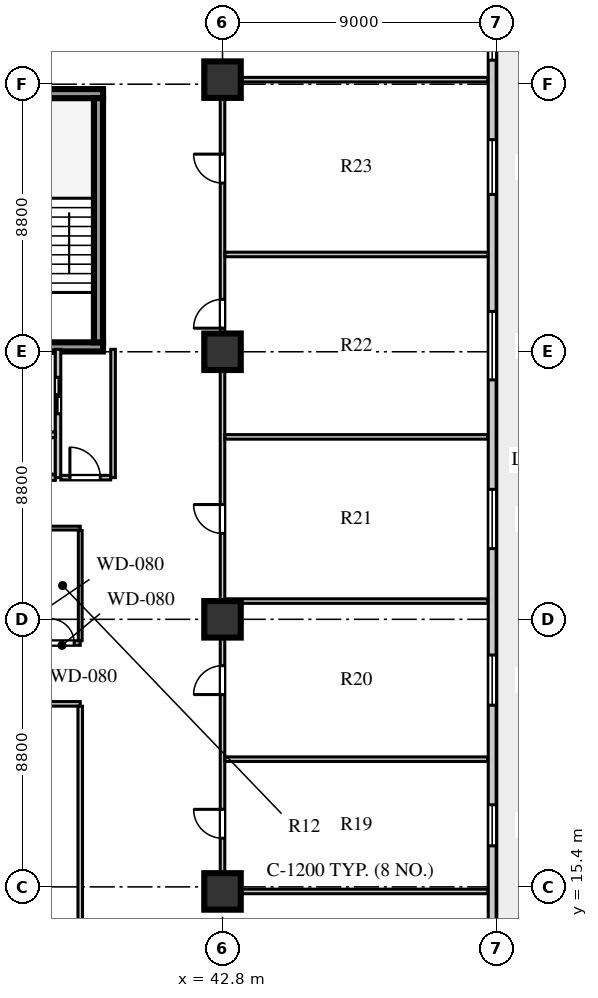
"""IFC4 building model, lengths in metres.
Left out: names, types, materials, properties, quantities, classifications, styles, units other than length and angle.
Written with IfcOpenShell. Run it as: python <this file> out.ifc"""

import sys

from ifc_helpers import new_model, si_unit, direction, frame, frame_2d, origin, origin_2d, place, context, subcontext, project, spatial, rectangle, extrude, element, fill, save


model = new_model("IFC4")
c1 = context("Model", 3, precision=1e-05, world=origin(), true_north=direction((0.0, 1.0)))
c2 = subcontext(c1, "Body", "Model", "MODEL_VIEW")
j1 = project(units=[si_unit("LENGTHUNIT", "METRE"), si_unit("PLANEANGLEUNIT", "RADIAN")], contexts=[c1])
p1 = place(None, origin())
s1 = spatial("IfcSite", under=j1, at=p1, CompositionType="ELEMENT")
p2 = place(p1, origin())
s2 = spatial("IfcBuilding", under=s1, at=p2, CompositionType="ELEMENT")
p3 = place(p2, frame((0.0, 0.0, 50.0)))
s3 = spatial("IfcBuildingStorey", under=s2, at=p3, CompositionType="ELEMENT", Elevation=50.0)
for number, where, z_axis, x_axis in (
    (1, (34.4, 33.16, 0.0), (0.0, 0.0, 1.0), (1.0, 0.0, 0.0)),
    (2, (34.4, 41.49, 0.0), (0.0, 0.0, 1.0), (1.0, 0.0, 0.0)),
):
    element("IfcWall", number, at=place(p3, frame(where, z_axis=z_axis, x_axis=x_axis)), inside=s3, PredefinedType="SHEAR", context=c2, shape_type="SweptSolid", body=[
        extrude(rectangle(XDim=4.47, YDim=0.3, at=frame_2d((2.235, 0.0))), origin(), (0.0, 0.0, 1.0), 3.72),
    ])
p4 = place(p3, frame((38.72, 33.31, 0.0), z_axis=(0.0, 0.0, 1.0), x_axis=(0.0, 1.0, 0.0)))
e3 = element("IfcWall", 3, at=p4, inside=s3, PredefinedType="SHEAR", context=c2, shape_type="SweptSolid", body=[
    extrude(rectangle(XDim=8.03, YDim=0.3, at=frame_2d((4.015, 0.0))), origin(), (0.0, 0.0, 1.0), 3.72),
])
for number, where, z_axis, x_axis in (
    (4, (42.8, 15.25, 0.0), (0.0, 0.0, 1.0), (1.0, 0.0, 0.0)),
    (5, (42.8, 24.2, 0.0), (0.0, 0.0, 1.0), (1.0, 0.0, 0.0)),
    (6, (42.8, 33.0, 0.0), (0.0, 0.0, 1.0), (1.0, 0.0, 0.0)),
    (7, (42.8, 41.95, 0.0), (0.0, 0.0, 1.0), (1.0, 0.0, 0.0)),
):
    element("IfcColumn", number, at=place(p3, frame(where, z_axis=z_axis, x_axis=x_axis)), inside=s3, PredefinedType="COLUMN", context=c2, shape_type="SweptSolid", body=[
        extrude(rectangle(XDim=1.2, YDim=1.2, at=origin_2d()), origin(), (0.0, 0.0, 1.0), 3.72),
    ])
p5 = place(p3, frame((51.67, 12.36, 0.0), z_axis=(0.0, 0.0, 1.0), x_axis=(0.0, 1.0, 0.0)))
e8 = element("IfcWall", 8, at=p5, inside=s3, PredefinedType="SOLIDWALL", context=c2, shape_type="SweptSolid", body=[
    extrude(rectangle(XDim=32.48, YDim=0.26, at=frame_2d((16.24, 0.0))), origin(), (0.0, 0.0, 1.0), 3.72),
])
p6 = place(p5, frame((0.69, 0.0, 0.0)))
e9 = element("IfcOpeningElement", 9, at=p6, cuts=e8, PredefinedType="OPENING", context=c2, shape_type="SweptSolid", body=[
    extrude(rectangle(XDim=1.0, YDim=2.05, at=frame_2d((0.5, 1.025))), frame((0.0, 0.14, 0.0), z_axis=(0.0, -1.0, 0.0), x_axis=(1.0, 0.0, 0.0)), (0.0, 0.0, 1.0), 0.28),
])
p7 = place(p5, frame((4.39, 0.0, 0.8)))
e10 = element("IfcOpeningElement", 10, at=p7, cuts=e8, PredefinedType="OPENING", context=c2, shape_type="SweptSolid", body=[
    extrude(rectangle(XDim=1.35, YDim=1.9, at=frame_2d((0.675, 0.95))), frame((0.0, 0.14, 0.0), z_axis=(0.0, -1.0, 0.0), x_axis=(1.0, 0.0, 0.0)), (0.0, 0.0, 1.0), 0.28),
])
p8 = place(p5, frame((9.015, 0.0, 0.8)))
e11 = element("IfcOpeningElement", 11, at=p8, cuts=e8, PredefinedType="OPENING", context=c2, shape_type="SweptSolid", body=[
    extrude(rectangle(XDim=1.65, YDim=1.95, at=frame_2d((0.825, 0.975))), frame((0.0, 0.14, 0.0), z_axis=(0.0, -1.0, 0.0), x_axis=(1.0, 0.0, 0.0)), (0.0, 0.0, 1.0), 0.28),
])
p9 = place(p5, frame((14.165, 0.0, 0.8)))
e12 = element("IfcOpeningElement", 12, at=p9, cuts=e8, PredefinedType="OPENING", context=c2, shape_type="SweptSolid", body=[
    extrude(rectangle(XDim=1.95, YDim=2.0, at=frame_2d((0.975, 1.0))), frame((0.0, 0.14, 0.0), z_axis=(0.0, -1.0, 0.0), x_axis=(1.0, 0.0, 0.0)), (0.0, 0.0, 1.0), 0.28),
])
p10 = place(p5, frame((19.715, 0.0, 0.8)))
e13 = element("IfcOpeningElement", 13, at=p10, cuts=e8, PredefinedType="OPENING", context=c2, shape_type="SweptSolid", body=[
    extrude(rectangle(XDim=2.25, YDim=2.0, at=frame_2d((1.125, 1.0))), frame((0.0, 0.14, 0.0), z_axis=(0.0, -1.0, 0.0), x_axis=(1.0, 0.0, 0.0)), (0.0, 0.0, 1.0), 0.28),
])
p11 = place(p5, frame((25.815, 0.0, 0.8)))
e14 = element("IfcOpeningElement", 14, at=p11, cuts=e8, PredefinedType="OPENING", context=c2, shape_type="SweptSolid", body=[
    extrude(rectangle(XDim=1.8, YDim=2.0, at=frame_2d((0.9, 1.0))), frame((0.0, 0.14, 0.0), z_axis=(0.0, -1.0, 0.0), x_axis=(1.0, 0.0, 0.0)), (0.0, 0.0, 1.0), 0.28),
])
p12 = place(p5, frame((30.23, 0.0, 0.8)))
e15 = element("IfcOpeningElement", 15, at=p12, cuts=e8, PredefinedType="OPENING", context=c2, shape_type="SweptSolid", body=[
    extrude(rectangle(XDim=1.5, YDim=2.0, at=frame_2d((0.75, 1.0))), frame((0.0, 0.14, 0.0), z_axis=(0.0, -1.0, 0.0), x_axis=(1.0, 0.0, 0.0)), (0.0, 0.0, 1.0), 0.28),
])
p13 = place(p3, frame((37.39, 28.86, 0.0), z_axis=(0.0, 0.0, 1.0), x_axis=(0.0, 1.0, 0.0)))
e16 = element("IfcWall", 16, at=p13, inside=s3, PredefinedType="SOLIDWALL", context=c2, shape_type="SweptSolid", body=[
    extrude(rectangle(XDim=4.22, YDim=0.18, at=frame_2d((2.11, 0.0))), origin(), (0.0, 0.0, 1.0), 3.72),
])
p14 = place(p13, frame((2.1, 0.0, 0.0)))
e17 = element("IfcOpeningElement", 17, at=p14, cuts=e16, PredefinedType="OPENING", context=c2, shape_type="SweptSolid", body=[
    extrude(rectangle(XDim=1.2, YDim=2.12, at=frame_2d((0.6, 1.06))), frame((0.0, 0.1, 0.0), z_axis=(0.0, -1.0, 0.0), x_axis=(1.0, 0.0, 0.0)), (0.0, 0.0, 1.0), 0.2),
])
for number, where, z_axis, x_axis in (
    (18, (35.05, 28.86, 0.0), (0.0, 0.0, 1.0), (1.0, 0.0, 0.0)),
    (19, (35.05, 30.27, 0.0), (0.0, 0.0, 1.0), (1.0, 0.0, 0.0)),
):
    element("IfcWall", number, at=place(p3, frame(where, z_axis=z_axis, x_axis=x_axis)), inside=s3, PredefinedType="SOLIDWALL", context=c2, shape_type="SweptSolid", body=[
        extrude(rectangle(XDim=2.25, YDim=0.18, at=frame_2d((1.125, 0.0))), origin(), (0.0, 0.0, 1.0), 3.72),
    ])
p15 = place(p3, frame((39.2, 28.86, 0.0), z_axis=(0.0, 0.0, 1.0), x_axis=(0.0, 1.0, 0.0)))
e20 = element("IfcWall", 20, at=p15, inside=s3, PredefinedType="PARTITIONING", context=c2, shape_type="SweptSolid", body=[
    extrude(rectangle(XDim=4.22, YDim=0.15, at=frame_2d((2.11, 0.0))), origin(), (0.0, 0.0, 1.0), 3.72),
])
p16 = place(p3, frame((37.48, 28.86, 0.0), z_axis=(0.0, 0.0, 1.0), x_axis=(1.0, 0.0, 0.0)))
e21 = element("IfcWall", 21, at=p16, inside=s3, PredefinedType="PARTITIONING", context=c2, shape_type="SweptSolid", body=[
    extrude(rectangle(XDim=1.64, YDim=0.15, at=frame_2d((0.82, 0.0))), origin(), (0.0, 0.0, 1.0), 3.72),
])
p17 = place(p16, frame((0.3, 0.0, 0.0)))
e22 = element("IfcOpeningElement", 22, at=p17, cuts=e21, PredefinedType="OPENING", context=c2, shape_type="SweptSolid", body=[
    extrude(rectangle(XDim=1.0, YDim=2.1, at=frame_2d((0.5, 1.05))), frame((0.0, 0.085, 0.0), z_axis=(0.0, -1.0, 0.0), x_axis=(1.0, 0.0, 0.0)), (0.0, 0.0, 1.0), 0.17),
])
p18 = place(p3, frame((25.25, 21.42, 0.0), z_axis=(0.0, 0.0, 1.0), x_axis=(1.0, 0.0, 0.0)))
e23 = element("IfcWall", 23, at=p18, inside=s3, PredefinedType="PARTITIONING", context=c2, shape_type="SweptSolid", body=[
    extrude(rectangle(XDim=12.87, YDim=0.15, at=frame_2d((6.435, 0.0))), origin(), (0.0, 0.0, 1.0), 3.32),
])
p19 = place(p18, frame((1.525, 0.0, 0.0)))
e24 = element("IfcOpeningElement", 24, at=p19, cuts=e23, PredefinedType="OPENING", context=c2, shape_type="SweptSolid", body=[
    extrude(rectangle(XDim=0.95, YDim=2.08, at=frame_2d((0.475, 1.04))), frame((0.0, 0.085, 0.0), z_axis=(0.0, -1.0, 0.0), x_axis=(1.0, 0.0, 0.0)), (0.0, 0.0, 1.0), 0.17),
])
p20 = place(p18, frame((5.775, 0.0, 0.0)))
e25 = element("IfcOpeningElement", 25, at=p20, cuts=e23, PredefinedType="OPENING", context=c2, shape_type="SweptSolid", body=[
    extrude(rectangle(XDim=0.95, YDim=2.08, at=frame_2d((0.475, 1.04))), frame((0.0, 0.085, 0.0), z_axis=(0.0, -1.0, 0.0), x_axis=(1.0, 0.0, 0.0)), (0.0, 0.0, 1.0), 0.17),
])
p21 = place(p18, frame((10.195, 0.0, 0.0)))
e26 = element("IfcOpeningElement", 26, at=p21, cuts=e23, PredefinedType="OPENING", context=c2, shape_type="SweptSolid", body=[
    extrude(rectangle(XDim=0.95, YDim=2.08, at=frame_2d((0.475, 1.04))), frame((0.0, 0.085, 0.0), z_axis=(0.0, -1.0, 0.0), x_axis=(1.0, 0.0, 0.0)), (0.0, 0.0, 1.0), 0.17),
])
p22 = place(p3, frame((38.12, 6.88, 0.0), z_axis=(0.0, 0.0, 1.0), x_axis=(0.0, 1.0, 0.0)))
e27 = element("IfcWall", 27, at=p22, inside=s3, PredefinedType="PARTITIONING", context=c2, shape_type="SweptSolid", body=[
    extrude(rectangle(XDim=14.46, YDim=0.15, at=frame_2d((7.23, 0.0))), origin(), (0.0, 0.0, 1.0), 3.72),
])
p23 = place(p3, frame((34.6, 23.42, 0.0), z_axis=(0.0, 0.0, 1.0), x_axis=(1.0, 0.0, 0.0)))
e28 = element("IfcWall", 28, at=p23, inside=s3, PredefinedType="PARTITIONING", context=c2, shape_type="SweptSolid", body=[
    extrude(rectangle(XDim=3.52, YDim=0.15, at=frame_2d((1.76, 0.0))), origin(), (0.0, 0.0, 1.0), 3.72),
])
p24 = place(p23, frame((0.22, 0.0, 0.0)))
e29 = element("IfcOpeningElement", 29, at=p24, cuts=e28, PredefinedType="OPENING", context=c2, shape_type="SweptSolid", body=[
    extrude(rectangle(XDim=0.8, YDim=2.05, at=frame_2d((0.4, 1.025))), frame((0.0, 0.085, 0.0), z_axis=(0.0, -1.0, 0.0), x_axis=(1.0, 0.0, 0.0)), (0.0, 0.0, 1.0), 0.17),
])
p25 = place(p23, frame((1.38, 0.0, 0.0)))
e30 = element("IfcOpeningElement", 30, at=p25, cuts=e28, PredefinedType="OPENING", context=c2, shape_type="SweptSolid", body=[
    extrude(rectangle(XDim=0.8, YDim=2.05, at=frame_2d((0.4, 1.025))), frame((0.0, 0.085, 0.0), z_axis=(0.0, -1.0, 0.0), x_axis=(1.0, 0.0, 0.0)), (0.0, 0.0, 1.0), 0.17),
])
p26 = place(p23, frame((2.52, 0.0, 0.0)))
e31 = element("IfcOpeningElement", 31, at=p26, cuts=e28, PredefinedType="OPENING", context=c2, shape_type="SweptSolid", body=[
    extrude(rectangle(XDim=0.8, YDim=2.05, at=frame_2d((0.4, 1.025))), frame((0.0, 0.085, 0.0), z_axis=(0.0, -1.0, 0.0), x_axis=(1.0, 0.0, 0.0)), (0.0, 0.0, 1.0), 0.17),
])
p27 = place(p3, frame((42.8, 15.25, 0.0), z_axis=(0.0, 0.0, 1.0), x_axis=(0.0, 1.0, 0.0)))
e32 = element("IfcWall", 32, at=p27, inside=s3, PredefinedType="PARTITIONING", context=c2, shape_type="SweptSolid", body=[
    extrude(rectangle(XDim=26.7, YDim=0.15, at=frame_2d((13.35, 0.0))), origin(), (0.0, 0.0, 1.0), 3.02),
])
p28 = place(p27, frame((1.75, 0.0, 0.0)))
e33 = element("IfcOpeningElement", 33, at=p28, cuts=e32, PredefinedType="OPENING", context=c2, shape_type="SweptSolid", body=[
    extrude(rectangle(XDim=0.95, YDim=2.08, at=frame_2d((0.475, 1.04))), frame((0.0, 0.085, 0.0), z_axis=(0.0, -1.0, 0.0), x_axis=(1.0, 0.0, 0.0)), (0.0, 0.0, 1.0), 0.17),
])
p29 = place(p27, frame((6.475, 0.0, 0.0)))
e34 = element("IfcOpeningElement", 34, at=p29, cuts=e32, PredefinedType="OPENING", context=c2, shape_type="SweptSolid", body=[
    extrude(rectangle(XDim=0.95, YDim=2.08, at=frame_2d((0.475, 1.04))), frame((0.0, 0.085, 0.0), z_axis=(0.0, -1.0, 0.0), x_axis=(1.0, 0.0, 0.0)), (0.0, 0.0, 1.0), 0.17),
])
p30 = place(p27, frame((11.775, 0.0, 0.0)))
e35 = element("IfcOpeningElement", 35, at=p30, cuts=e32, PredefinedType="OPENING", context=c2, shape_type="SweptSolid", body=[
    extrude(rectangle(XDim=0.95, YDim=2.08, at=frame_2d((0.475, 1.04))), frame((0.0, 0.085, 0.0), z_axis=(0.0, -1.0, 0.0), x_axis=(1.0, 0.0, 0.0)), (0.0, 0.0, 1.0), 0.17),
])
p31 = place(p27, frame((18.525, 0.0, 0.0)))
e36 = element("IfcOpeningElement", 36, at=p31, cuts=e32, PredefinedType="OPENING", context=c2, shape_type="SweptSolid", body=[
    extrude(rectangle(XDim=0.95, YDim=2.08, at=frame_2d((0.475, 1.04))), frame((0.0, 0.085, 0.0), z_axis=(0.0, -1.0, 0.0), x_axis=(1.0, 0.0, 0.0)), (0.0, 0.0, 1.0), 0.17),
])
p32 = place(p27, frame((23.3, 0.0, 0.0)))
e37 = element("IfcOpeningElement", 37, at=p32, cuts=e32, PredefinedType="OPENING", context=c2, shape_type="SweptSolid", body=[
    extrude(rectangle(XDim=0.95, YDim=2.08, at=frame_2d((0.475, 1.04))), frame((0.0, 0.085, 0.0), z_axis=(0.0, -1.0, 0.0), x_axis=(1.0, 0.0, 0.0)), (0.0, 0.0, 1.0), 0.17),
])
for number, where, z_axis, x_axis in (
    (38, (42.88, 15.25, 0.0), (0.0, 0.0, 1.0), (1.0, 0.0, 0.0)),
    (39, (42.88, 41.95, 0.0), (0.0, 0.0, 1.0), (1.0, 0.0, 0.0)),
):
    element("IfcWall", number, at=place(p3, frame(where, z_axis=z_axis, x_axis=x_axis)), inside=s3, PredefinedType="PARTITIONING", context=c2, shape_type="SweptSolid", body=[
        extrude(rectangle(XDim=8.64, YDim=0.15, at=frame_2d((4.32, 0.0))), origin(), (0.0, 0.0, 1.0), 3.22),
    ])
p33 = place(p3, frame((34.6, 27.2, 0.0), z_axis=(0.0, 0.0, 1.0), x_axis=(1.0, 0.0, 0.0)))
e40 = element("IfcWall", 40, at=p33, inside=s3, PredefinedType="PLUMBINGWALL", context=c2, shape_type="SweptSolid", body=[
    extrude(rectangle(XDim=3.52, YDim=0.125, at=frame_2d((1.76, 0.0))), origin(), (0.0, 0.0, 1.0), 3.32),
])
p34 = place(p3, frame((38.12, 23.5, 0.0), z_axis=(0.0, 0.0, 1.0), x_axis=(0.0, 1.0, 0.0)))
e41 = element("IfcWall", 41, at=p34, inside=s3, PredefinedType="PLUMBINGWALL", context=c2, shape_type="SweptSolid", body=[
    extrude(rectangle(XDim=3.62, YDim=0.125, at=frame_2d((1.81, 0.0))), origin(), (0.0, 0.0, 1.0), 3.72),
])
for number, where, z_axis, x_axis in (
    (42, (42.88, 19.6, 0.0), (0.0, 0.0, 1.0), (1.0, 0.0, 0.0)),
    (43, (42.88, 24.8, 0.0), (0.0, 0.0, 1.0), (1.0, 0.0, 0.0)),
    (44, (42.88, 30.2, 0.0), (0.0, 0.0, 1.0), (1.0, 0.0, 0.0)),
    (45, (42.88, 36.2, 0.0), (0.0, 0.0, 1.0), (1.0, 0.0, 0.0)),
):
    element("IfcWall", number, at=place(p3, frame(where, z_axis=z_axis, x_axis=x_axis)), inside=s3, PredefinedType="PARTITIONING", context=c2, shape_type="SweptSolid", body=[
        extrude(rectangle(XDim=8.64, YDim=0.15, at=frame_2d((4.32, 0.0))), origin(), (0.0, 0.0, 1.0), 3.72),
    ])
p35 = place(p7, origin())
e46 = element("IfcWindow", 46, at=p35, inside=s3, PartitioningType="SINGLE_PANEL", PredefinedType="WINDOW", context=c2, shape_type="SweptSolid", body=[
    extrude(rectangle(XDim=1.35, YDim=1.9, at=frame_2d((0.675, 0.95))), frame((0.0, 0.03, 0.0), z_axis=(0.0, -1.0, 0.0), x_axis=(1.0, 0.0, 0.0)), (0.0, 0.0, 1.0), 0.06),
])
fill(e10, e46)
p36 = place(p8, origin())
e47 = element("IfcWindow", 47, at=p36, inside=s3, PartitioningType="SINGLE_PANEL", PredefinedType="WINDOW", context=c2, shape_type="SweptSolid", body=[
    extrude(rectangle(XDim=1.65, YDim=1.95, at=frame_2d((0.825, 0.975))), frame((0.0, 0.03, 0.0), z_axis=(0.0, -1.0, 0.0), x_axis=(1.0, 0.0, 0.0)), (0.0, 0.0, 1.0), 0.06),
])
fill(e11, e47)
p37 = place(p9, origin())
e48 = element("IfcWindow", 48, at=p37, inside=s3, PartitioningType="SINGLE_PANEL", PredefinedType="WINDOW", context=c2, shape_type="SweptSolid", body=[
    extrude(rectangle(XDim=1.95, YDim=2.0, at=frame_2d((0.975, 1.0))), frame((0.0, 0.03, 0.0), z_axis=(0.0, -1.0, 0.0), x_axis=(1.0, 0.0, 0.0)), (0.0, 0.0, 1.0), 0.06),
])
fill(e12, e48)
p38 = place(p10, origin())
e49 = element("IfcWindow", 49, at=p38, inside=s3, PartitioningType="SINGLE_PANEL", PredefinedType="WINDOW", context=c2, shape_type="SweptSolid", body=[
    extrude(rectangle(XDim=2.25, YDim=2.0, at=frame_2d((1.125, 1.0))), frame((0.0, 0.03, 0.0), z_axis=(0.0, -1.0, 0.0), x_axis=(1.0, 0.0, 0.0)), (0.0, 0.0, 1.0), 0.06),
])
fill(e13, e49)
p39 = place(p11, origin())
e50 = element("IfcWindow", 50, at=p39, inside=s3, PartitioningType="SINGLE_PANEL", PredefinedType="WINDOW", context=c2, shape_type="SweptSolid", body=[
    extrude(rectangle(XDim=1.8, YDim=2.0, at=frame_2d((0.9, 1.0))), frame((0.0, 0.03, 0.0), z_axis=(0.0, -1.0, 0.0), x_axis=(1.0, 0.0, 0.0)), (0.0, 0.0, 1.0), 0.06),
])
fill(e14, e50)
p40 = place(p12, origin())
e51 = element("IfcWindow", 51, at=p40, inside=s3, PartitioningType="SINGLE_PANEL", PredefinedType="WINDOW", context=c2, shape_type="SweptSolid", body=[
    extrude(rectangle(XDim=1.5, YDim=2.0, at=frame_2d((0.75, 1.0))), frame((0.0, 0.03, 0.0), z_axis=(0.0, -1.0, 0.0), x_axis=(1.0, 0.0, 0.0)), (0.0, 0.0, 1.0), 0.06),
])
fill(e15, e51)
p41 = place(p14, frame((1.2, 0.0, 0.0), z_axis=(0.0, 0.0, 1.0), x_axis=(-1.0, 0.0, 0.0)))
e52 = element("IfcDoor", 52, at=p41, inside=s3, OperationType="DOUBLE_DOOR_SLIDING", PredefinedType="DOOR", context=c2, shape_type="SweptSolid", body=[
    extrude(rectangle(XDim=1.2, YDim=2.12, at=frame_2d((0.6, 1.06))), frame((0.0, 0.025, 0.0), z_axis=(0.0, -1.0, 0.0), x_axis=(1.0, 0.0, 0.0)), (0.0, 0.0, 1.0), 0.05),
])
fill(e17, e52)
p42 = place(p17, origin())
e53 = element("IfcDoor", 53, at=p42, inside=s3, OperationType="SINGLE_SWING_LEFT", PredefinedType="DOOR", context=c2, shape_type="SweptSolid", body=[
    extrude(rectangle(XDim=1.0, YDim=2.1, at=frame_2d((0.5, 1.05))), frame((0.0, 0.025, 0.0), z_axis=(0.0, -1.0, 0.0), x_axis=(1.0, 0.0, 0.0)), (0.0, 0.0, 1.0), 0.05),
])
fill(e22, e53)
p43 = place(p26, origin())
e54 = element("IfcDoor", 54, at=p43, inside=s3, OperationType="SINGLE_SWING_LEFT", PredefinedType="DOOR", context=c2, shape_type="SweptSolid", body=[
    extrude(rectangle(XDim=0.8, YDim=2.05, at=frame_2d((0.4, 1.025))), frame((0.0, 0.025, 0.0), z_axis=(0.0, -1.0, 0.0), x_axis=(1.0, 0.0, 0.0)), (0.0, 0.0, 1.0), 0.05),
])
fill(e31, e54)
p44 = place(p28, origin())
e55 = element("IfcDoor", 55, at=p44, inside=s3, OperationType="SINGLE_SWING_RIGHT", PredefinedType="DOOR", context=c2, shape_type="SweptSolid", body=[
    extrude(rectangle(XDim=0.95, YDim=2.08, at=frame_2d((0.475, 1.04))), frame((0.0, 0.025, 0.0), z_axis=(0.0, -1.0, 0.0), x_axis=(1.0, 0.0, 0.0)), (0.0, 0.0, 1.0), 0.05),
])
fill(e33, e55)
p45 = place(p29, origin())
e56 = element("IfcDoor", 56, at=p45, inside=s3, OperationType="SINGLE_SWING_LEFT", PredefinedType="DOOR", context=c2, shape_type="SweptSolid", body=[
    extrude(rectangle(XDim=0.95, YDim=2.08, at=frame_2d((0.475, 1.04))), frame((0.0, 0.025, 0.0), z_axis=(0.0, -1.0, 0.0), x_axis=(1.0, 0.0, 0.0)), (0.0, 0.0, 1.0), 0.05),
])
fill(e34, e56)
p46 = place(p30, origin())
e57 = element("IfcDoor", 57, at=p46, inside=s3, OperationType="SINGLE_SWING_RIGHT", PredefinedType="DOOR", context=c2, shape_type="SweptSolid", body=[
    extrude(rectangle(XDim=0.95, YDim=2.08, at=frame_2d((0.475, 1.04))), frame((0.0, 0.025, 0.0), z_axis=(0.0, -1.0, 0.0), x_axis=(1.0, 0.0, 0.0)), (0.0, 0.0, 1.0), 0.05),
])
fill(e35, e57)
p47 = place(p31, origin())
e58 = element("IfcDoor", 58, at=p47, inside=s3, OperationType="SINGLE_SWING_LEFT", PredefinedType="DOOR", context=c2, shape_type="SweptSolid", body=[
    extrude(rectangle(XDim=0.95, YDim=2.08, at=frame_2d((0.475, 1.04))), frame((0.0, 0.025, 0.0), z_axis=(0.0, -1.0, 0.0), x_axis=(1.0, 0.0, 0.0)), (0.0, 0.0, 1.0), 0.05),
])
fill(e36, e58)
p48 = place(p32, origin())
e59 = element("IfcDoor", 59, at=p48, inside=s3, OperationType="SINGLE_SWING_RIGHT", PredefinedType="DOOR", context=c2, shape_type="SweptSolid", body=[
    extrude(rectangle(XDim=0.95, YDim=2.08, at=frame_2d((0.475, 1.04))), frame((0.0, 0.025, 0.0), z_axis=(0.0, -1.0, 0.0), x_axis=(1.0, 0.0, 0.0)), (0.0, 0.0, 1.0), 0.05),
])
fill(e37, e59)
save(model, sys.argv[1])
